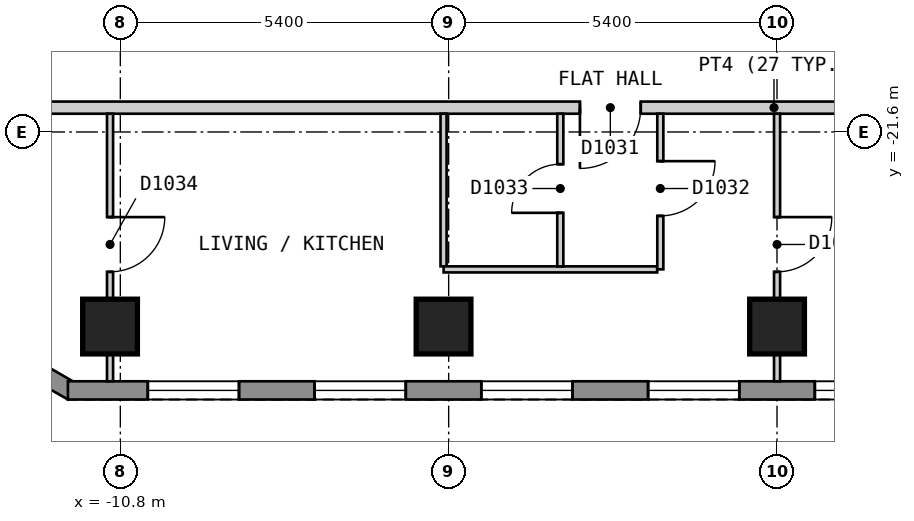
"""IFC4 building model, lengths in metres.
Left out: names, types, materials, properties, quantities, classifications, styles, units other than length and angle.
Written with IfcOpenShell. Run it as: python <this file> out.ifc"""

import sys

from ifc_helpers import new_model, si_unit, direction, frame, frame_2d, origin, origin_2d, place, context, subcontext, project, spatial, polyline, rectangle, outline, extrude, element, fill, save


model = new_model("IFC4")
c1 = context("Model", 3, precision=1e-05, world=origin(), true_north=direction((0.0, 1.0)))
c2 = subcontext(c1, "Body", "Model", "MODEL_VIEW")
j1 = project(units=[si_unit("LENGTHUNIT", "METRE"), si_unit("PLANEANGLEUNIT", "RADIAN")], contexts=[c1])
p1 = place(None, origin())
s1 = spatial("IfcSite", under=j1, at=p1, CompositionType="ELEMENT")
p2 = place(p1, origin())
s2 = spatial("IfcBuilding", under=s1, at=p2, CompositionType="ELEMENT")
p3 = place(p2, frame((0.0, 0.0, 126.6)))
s3 = spatial("IfcBuildingStorey", under=s2, at=p3, CompositionType="ELEMENT", Elevation=126.6)
for number, where, z_axis, x_axis in (
    (1, (-10.969, -24.8, 0.0), (0.0, 0.0, 1.0), (1.0, 0.0, 0.0)),
    (2, (-5.484, -24.8, 0.0), (0.0, 0.0, 1.0), (1.0, 0.0, 0.0)),
    (3, (0.001, -24.8, 0.0), (0.0, 0.0, 1.0), (1.0, 0.0, 0.0)),
):
    element("IfcColumn", number, at=place(p3, frame(where, z_axis=z_axis, x_axis=x_axis)), inside=s3, PredefinedType="COLUMN", context=c2, shape_type="SweptSolid", body=[
        extrude(rectangle(XDim=0.9, YDim=0.9, at=origin_2d()), origin(), (0.0, 0.0, 1.0), 3.0),
    ])
p4 = place(p3, frame((-15.917, -23.37, 0.0), z_axis=(0.0, 0.0, 1.0), x_axis=(0.866022959057, -0.500004234368, 0.0)))
e4 = element("IfcWall", 4, at=p4, inside=s3, PredefinedType="SOLIDWALL", context=c2, shape_type="SweptSolid", body=[
    extrude(outline(polyline([(0.0, -0.15), (5.0, -0.15), (4.92, 0.15), (0.08, 0.15), (0.0, -0.15)])), origin(), (0.0, 0.0, 1.0), 2.7),
])
p5 = place(p4, frame((0.65, 0.0, 0.15)))
e5 = element("IfcOpeningElement", 5, at=p5, cuts=e4, PredefinedType="OPENING", context=c2, shape_type="SweptSolid", body=[
    extrude(rectangle(XDim=1.2, YDim=2.1, at=frame_2d((0.6, 1.05))), frame((0.0, 0.16, 0.0), z_axis=(0.0, -1.0, 0.0), x_axis=(1.0, 0.0, 0.0)), (0.0, 0.0, 1.0), 0.32),
])
p6 = place(p4, frame((3.15, 0.0, 0.15)))
e6 = element("IfcOpeningElement", 6, at=p6, cuts=e4, PredefinedType="OPENING", context=c2, shape_type="SweptSolid", body=[
    extrude(rectangle(XDim=1.2, YDim=2.1, at=frame_2d((0.6, 1.05))), frame((0.0, 0.16, 0.0), z_axis=(0.0, -1.0, 0.0), x_axis=(1.0, 0.0, 0.0)), (0.0, 0.0, 1.0), 0.32),
])
p7 = place(p3, frame((-11.662, -25.85, 0.0), z_axis=(0.0, 0.0, 1.0), x_axis=(1.0, 0.0, 0.0)))
e7 = element("IfcWall", 7, at=p7, inside=s3, PredefinedType="SOLIDWALL", context=c2, shape_type="SweptSolid", body=[
    extrude(outline(polyline([(0.0, -0.15), (23.324, -0.15), (23.244, 0.15), (0.08, 0.15), (0.0, -0.15)])), origin(), (0.0, 0.0, 1.0), 2.7),
])
p8 = place(p7, frame((1.314, 0.0, 0.15)))
e8 = element("IfcOpeningElement", 8, at=p8, cuts=e7, PredefinedType="OPENING", context=c2, shape_type="SweptSolid", body=[
    extrude(rectangle(XDim=1.5, YDim=2.1, at=frame_2d((0.75, 1.05))), frame((0.0, 0.16, 0.0), z_axis=(0.0, -1.0, 0.0), x_axis=(1.0, 0.0, 0.0)), (0.0, 0.0, 1.0), 0.32),
])
p9 = place(p7, frame((4.057, 0.0, 0.15)))
e9 = element("IfcOpeningElement", 9, at=p9, cuts=e7, PredefinedType="OPENING", context=c2, shape_type="SweptSolid", body=[
    extrude(rectangle(XDim=1.5, YDim=2.1, at=frame_2d((0.75, 1.05))), frame((0.0, 0.16, 0.0), z_axis=(0.0, -1.0, 0.0), x_axis=(1.0, 0.0, 0.0)), (0.0, 0.0, 1.0), 0.32),
])
p10 = place(p7, frame((6.799, 0.0, 0.15)))
e10 = element("IfcOpeningElement", 10, at=p10, cuts=e7, PredefinedType="OPENING", context=c2, shape_type="SweptSolid", body=[
    extrude(rectangle(XDim=1.5, YDim=2.1, at=frame_2d((0.75, 1.05))), frame((0.0, 0.16, 0.0), z_axis=(0.0, -1.0, 0.0), x_axis=(1.0, 0.0, 0.0)), (0.0, 0.0, 1.0), 0.32),
])
p11 = place(p7, frame((9.542, 0.0, 0.15)))
e11 = element("IfcOpeningElement", 11, at=p11, cuts=e7, PredefinedType="OPENING", context=c2, shape_type="SweptSolid", body=[
    extrude(rectangle(XDim=1.5, YDim=2.1, at=frame_2d((0.75, 1.05))), frame((0.0, 0.16, 0.0), z_axis=(0.0, -1.0, 0.0), x_axis=(1.0, 0.0, 0.0)), (0.0, 0.0, 1.0), 0.32),
])
p12 = place(p7, frame((12.284, 0.0, 0.15)))
e12 = element("IfcOpeningElement", 12, at=p12, cuts=e7, PredefinedType="OPENING", context=c2, shape_type="SweptSolid", body=[
    extrude(rectangle(XDim=1.5, YDim=2.1, at=frame_2d((0.75, 1.05))), frame((0.0, 0.16, 0.0), z_axis=(0.0, -1.0, 0.0), x_axis=(1.0, 0.0, 0.0)), (0.0, 0.0, 1.0), 0.32),
])
p13 = place(p7, frame((15.027, 0.0, 0.15)))
e13 = element("IfcOpeningElement", 13, at=p13, cuts=e7, PredefinedType="OPENING", context=c2, shape_type="SweptSolid", body=[
    extrude(rectangle(XDim=1.5, YDim=2.1, at=frame_2d((0.75, 1.05))), frame((0.0, 0.16, 0.0), z_axis=(0.0, -1.0, 0.0), x_axis=(1.0, 0.0, 0.0)), (0.0, 0.0, 1.0), 0.32),
])
p14 = place(p7, frame((17.769, 0.0, 0.15)))
e14 = element("IfcOpeningElement", 14, at=p14, cuts=e7, PredefinedType="OPENING", context=c2, shape_type="SweptSolid", body=[
    extrude(rectangle(XDim=1.5, YDim=2.1, at=frame_2d((0.75, 1.05))), frame((0.0, 0.16, 0.0), z_axis=(0.0, -1.0, 0.0), x_axis=(1.0, 0.0, 0.0)), (0.0, 0.0, 1.0), 0.32),
])
p15 = place(p7, frame((20.512, 0.0, 0.15)))
e15 = element("IfcOpeningElement", 15, at=p15, cuts=e7, PredefinedType="OPENING", context=c2, shape_type="SweptSolid", body=[
    extrude(rectangle(XDim=1.5, YDim=2.1, at=frame_2d((0.75, 1.05))), frame((0.0, 0.16, 0.0), z_axis=(0.0, -1.0, 0.0), x_axis=(1.0, 0.0, 0.0)), (0.0, 0.0, 1.0), 0.32),
])
p16 = place(p3, frame((-15.499, -21.2, 0.0), z_axis=(0.0, 0.0, 1.0), x_axis=(1.0, 0.0, 0.0)))
e16 = element("IfcWall", 16, at=p16, inside=s3, PredefinedType="PARTITIONING", context=c2, shape_type="SweptSolid", body=[
    extrude(rectangle(XDim=30.899, YDim=0.2, at=frame_2d((15.449, 0.0))), origin(), (0.0, 0.0, 1.0), 2.7),
])
p17 = place(p16, frame((12.258, 0.0, 0.0)))
e17 = element("IfcOpeningElement", 17, at=p17, cuts=e16, PredefinedType="OPENING", context=c2, shape_type="SweptSolid", body=[
    extrude(rectangle(XDim=1.0, YDim=2.1, at=frame_2d((0.5, 1.05))), frame((0.0, 0.11, 0.0), z_axis=(0.0, -1.0, 0.0), x_axis=(1.0, 0.0, 0.0)), (0.0, 0.0, 1.0), 0.22),
])
p18 = place(p3, frame((-5.484, -21.3, 0.0), z_axis=(0.0, 0.0, 1.0), x_axis=(0.0, -1.0, 0.0)))
e18 = element("IfcWall", 18, at=p18, inside=s3, PredefinedType="PARTITIONING", context=c2, shape_type="SweptSolid", body=[
    extrude(rectangle(XDim=2.509, YDim=0.1, at=frame_2d((1.254, 0.0))), origin(), (0.0, 0.0, 1.0), 2.7),
])
p19 = place(p3, frame((0.001, -21.3, 0.0), z_axis=(0.0, 0.0, 1.0), x_axis=(0.0, -1.0, 0.0)))
e19 = element("IfcWall", 19, at=p19, inside=s3, PredefinedType="PARTITIONING", context=c2, shape_type="SweptSolid", body=[
    extrude(rectangle(XDim=4.4, YDim=0.1, at=frame_2d((2.2, 0.0))), origin(), (0.0, 0.0, 1.0), 2.7),
])
p20 = place(p19, frame((1.7, 0.0, 0.0)))
e20 = element("IfcOpeningElement", 20, at=p20, cuts=e19, PredefinedType="OPENING", context=c2, shape_type="SweptSolid", body=[
    extrude(rectangle(XDim=0.9, YDim=2.1, at=frame_2d((0.45, 1.05))), frame((0.0, 0.06, 0.0), z_axis=(0.0, -1.0, 0.0), x_axis=(1.0, 0.0, 0.0)), (0.0, 0.0, 1.0), 0.12),
])
p21 = place(p3, frame((-5.483, -23.86, 0.0), z_axis=(0.0, 0.0, 1.0), x_axis=(1.0, 0.0, 0.0)))
e21 = element("IfcWall", 21, at=p21, inside=s3, PredefinedType="PARTITIONING", context=c2, shape_type="SweptSolid", body=[
    extrude(rectangle(XDim=3.513, YDim=0.1, at=frame_2d((1.756, 0.0))), origin(), (0.0, 0.0, 1.0), 2.7),
])
p22 = place(p3, frame((-3.564, -23.81, 0.0), z_axis=(0.0, 0.0, 1.0), x_axis=(0.0, 1.0, 0.0)))
e22 = element("IfcWall", 22, at=p22, inside=s3, PredefinedType="PARTITIONING", context=c2, shape_type="SweptSolid", body=[
    extrude(rectangle(XDim=2.51, YDim=0.1, at=frame_2d((1.255, 0.0))), origin(), (0.0, 0.0, 1.0), 2.7),
])
p23 = place(p22, frame((0.88, 0.0, 0.0)))
e23 = element("IfcOpeningElement", 23, at=p23, cuts=e22, PredefinedType="OPENING", context=c2, shape_type="SweptSolid", body=[
    extrude(rectangle(XDim=0.8, YDim=2.1, at=frame_2d((0.4, 1.05))), frame((0.0, 0.06, 0.0), z_axis=(0.0, -1.0, 0.0), x_axis=(1.0, 0.0, 0.0)), (0.0, 0.0, 1.0), 0.12),
])
p24 = place(p3, frame((-10.969, -25.7, 0.0), z_axis=(0.0, 0.0, 1.0), x_axis=(0.0, 1.0, 0.0)))
e24 = element("IfcWall", 24, at=p24, inside=s3, PredefinedType="PARTITIONING", context=c2, shape_type="SweptSolid", body=[
    extrude(rectangle(XDim=4.4, YDim=0.1, at=frame_2d((2.2, 0.0))), origin(), (0.0, 0.0, 1.0), 2.7),
])
p25 = place(p24, frame((1.8, 0.0, 0.0)))
e25 = element("IfcOpeningElement", 25, at=p25, cuts=e24, PredefinedType="OPENING", context=c2, shape_type="SweptSolid", body=[
    extrude(rectangle(XDim=0.9, YDim=2.1, at=frame_2d((0.45, 1.05))), frame((0.0, 0.06, 0.0), z_axis=(0.0, -1.0, 0.0), x_axis=(1.0, 0.0, 0.0)), (0.0, 0.0, 1.0), 0.12),
])
p26 = place(p3, frame((-1.919, -23.859, 0.0), z_axis=(0.0, 0.0, 1.0), x_axis=(0.0, 1.0, 0.0)))
e26 = element("IfcWall", 26, at=p26, inside=s3, PredefinedType="PARTITIONING", context=c2, shape_type="SweptSolid", body=[
    extrude(rectangle(XDim=2.559, YDim=0.1, at=frame_2d((1.279, 0.0))), origin(), (0.0, 0.0, 1.0), 2.7),
])
p27 = place(p26, frame((0.879, 0.0, 0.0)))
e27 = element("IfcOpeningElement", 27, at=p27, cuts=e26, PredefinedType="OPENING", context=c2, shape_type="SweptSolid", body=[
    extrude(rectangle(XDim=0.9, YDim=2.1, at=frame_2d((0.45, 1.05))), frame((0.0, 0.06, 0.0), z_axis=(0.0, -1.0, 0.0), x_axis=(1.0, 0.0, 0.0)), (0.0, 0.0, 1.0), 0.12),
])
p28 = place(p8, origin())
e28 = element("IfcWindow", 28, at=p28, inside=s3, PartitioningType="SINGLE_PANEL", PredefinedType="WINDOW", context=c2, shape_type="SweptSolid", body=[
    extrude(rectangle(XDim=1.5, YDim=2.1, at=frame_2d((0.75, 1.05))), frame((0.0, 0.03, 0.0), z_axis=(0.0, -1.0, 0.0), x_axis=(1.0, 0.0, 0.0)), (0.0, 0.0, 1.0), 0.06),
])
fill(e8, e28)
p29 = place(p9, origin())
e29 = element("IfcWindow", 29, at=p29, inside=s3, PartitioningType="SINGLE_PANEL", PredefinedType="WINDOW", context=c2, shape_type="SweptSolid", body=[
    extrude(rectangle(XDim=1.5, YDim=2.1, at=frame_2d((0.75, 1.05))), frame((0.0, 0.03, 0.0), z_axis=(0.0, -1.0, 0.0), x_axis=(1.0, 0.0, 0.0)), (0.0, 0.0, 1.0), 0.06),
])
fill(e9, e29)
p30 = place(p10, origin())
e30 = element("IfcWindow", 30, at=p30, inside=s3, PartitioningType="SINGLE_PANEL", PredefinedType="WINDOW", context=c2, shape_type="SweptSolid", body=[
    extrude(rectangle(XDim=1.5, YDim=2.1, at=frame_2d((0.75, 1.05))), frame((0.0, 0.03, 0.0), z_axis=(0.0, -1.0, 0.0), x_axis=(1.0, 0.0, 0.0)), (0.0, 0.0, 1.0), 0.06),
])
fill(e10, e30)
p31 = place(p11, origin())
e31 = element("IfcWindow", 31, at=p31, inside=s3, PartitioningType="SINGLE_PANEL", PredefinedType="WINDOW", context=c2, shape_type="SweptSolid", body=[
    extrude(rectangle(XDim=1.5, YDim=2.1, at=frame_2d((0.75, 1.05))), frame((0.0, 0.03, 0.0), z_axis=(0.0, -1.0, 0.0), x_axis=(1.0, 0.0, 0.0)), (0.0, 0.0, 1.0), 0.06),
])
fill(e11, e31)
p32 = place(p12, origin())
e32 = element("IfcWindow", 32, at=p32, inside=s3, PartitioningType="SINGLE_PANEL", PredefinedType="WINDOW", context=c2, shape_type="SweptSolid", body=[
    extrude(rectangle(XDim=1.5, YDim=2.1, at=frame_2d((0.75, 1.05))), frame((0.0, 0.03, 0.0), z_axis=(0.0, -1.0, 0.0), x_axis=(1.0, 0.0, 0.0)), (0.0, 0.0, 1.0), 0.06),
])
fill(e12, e32)
p33 = place(p17, origin())
e33 = element("IfcDoor", 33, at=p33, inside=s3, OperationType="SINGLE_SWING_LEFT", PredefinedType="DOOR", context=c2, shape_type="SweptSolid", body=[
    extrude(rectangle(XDim=1.0, YDim=2.1, at=frame_2d((0.5, 1.05))), frame((0.0, 0.025, 0.0), z_axis=(0.0, -1.0, 0.0), x_axis=(1.0, 0.0, 0.0)), (0.0, 0.0, 1.0), 0.05),
])
fill(e17, e33)
p34 = place(p27, origin())
e34 = element("IfcDoor", 34, at=p34, inside=s3, OperationType="SINGLE_SWING_RIGHT", PredefinedType="DOOR", context=c2, shape_type="SweptSolid", body=[
    extrude(rectangle(XDim=0.9, YDim=2.1, at=frame_2d((0.45, 1.05))), frame((0.0, 0.025, 0.0), z_axis=(0.0, -1.0, 0.0), x_axis=(1.0, 0.0, 0.0)), (0.0, 0.0, 1.0), 0.05),
])
fill(e27, e34)
p35 = place(p23, origin())
e35 = element("IfcDoor", 35, at=p35, inside=s3, OperationType="SINGLE_SWING_LEFT", PredefinedType="DOOR", context=c2, shape_type="SweptSolid", body=[
    extrude(rectangle(XDim=0.8, YDim=2.1, at=frame_2d((0.4, 1.05))), frame((0.0, 0.025, 0.0), z_axis=(0.0, -1.0, 0.0), x_axis=(1.0, 0.0, 0.0)), (0.0, 0.0, 1.0), 0.05),
])
fill(e23, e35)
p36 = place(p25, origin())
e36 = element("IfcDoor", 36, at=p36, inside=s3, OperationType="SINGLE_SWING_RIGHT", PredefinedType="DOOR", context=c2, shape_type="SweptSolid", body=[
    extrude(rectangle(XDim=0.9, YDim=2.1, at=frame_2d((0.45, 1.05))), frame((0.0, 0.025, 0.0), z_axis=(0.0, -1.0, 0.0), x_axis=(1.0, 0.0, 0.0)), (0.0, 0.0, 1.0), 0.05),
])
fill(e25, e36)
p37 = place(p20, origin())
e37 = element("IfcDoor", 37, at=p37, inside=s3, OperationType="SINGLE_SWING_LEFT", PredefinedType="DOOR", context=c2, shape_type="SweptSolid", body=[
    extrude(rectangle(XDim=0.9, YDim=2.1, at=frame_2d((0.45, 1.05))), frame((0.0, 0.025, 0.0), z_axis=(0.0, -1.0, 0.0), x_axis=(1.0, 0.0, 0.0)), (0.0, 0.0, 1.0), 0.05),
])
fill(e20, e37)
save(model, sys.argv[1])
